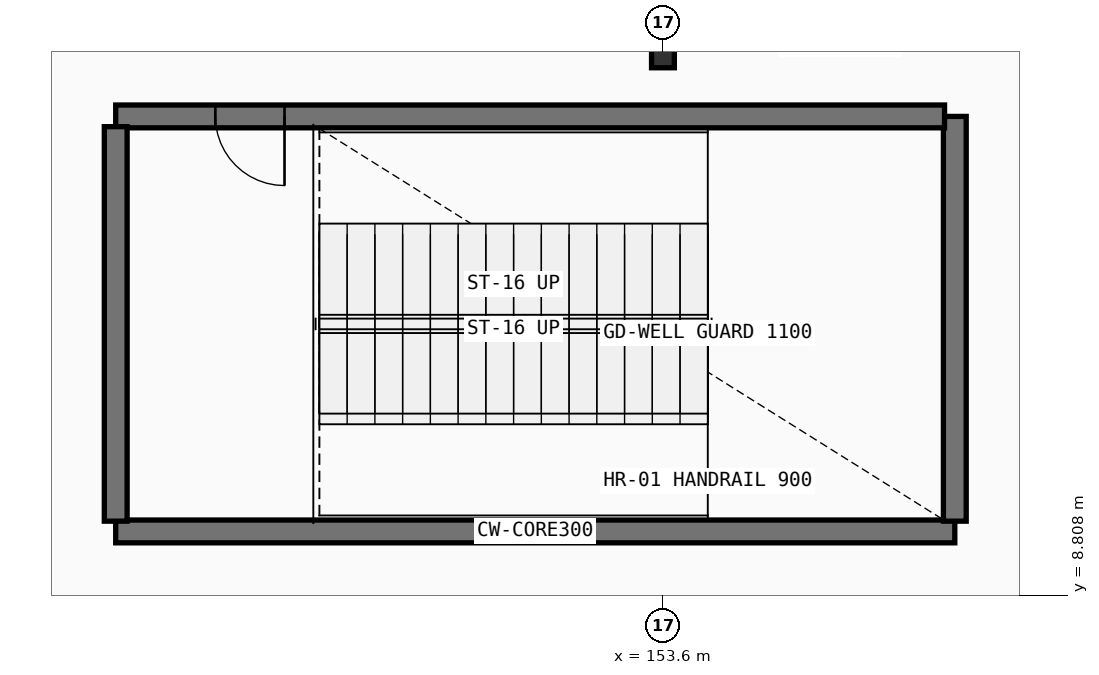
"""IFC4 building model, lengths in metres.
Left out: names, types, materials, properties, quantities, classifications, styles, units other than length and angle.
Written with IfcOpenShell. Run it as: python <this file> out.ifc"""

import sys

from ifc_helpers import new_model, si_unit, direction, frame, frame_2d, origin, origin_2d, place, context, subcontext, project, spatial, rectangle, i_section, extrude, element, fill, save


model = new_model("IFC4")
c1 = context("Model", 3, precision=1e-05, world=origin(), true_north=direction((0.0, 1.0)))
c2 = subcontext(c1, "Body", "Model", "MODEL_VIEW")
j1 = project(units=[si_unit("LENGTHUNIT", "METRE"), si_unit("PLANEANGLEUNIT", "RADIAN")], contexts=[c1])
p1 = place(None, origin())
s1 = spatial("IfcSite", under=j1, at=p1, CompositionType="ELEMENT")
p2 = place(p1, origin())
s2 = spatial("IfcBuilding", under=s1, at=p2, CompositionType="ELEMENT")
p3 = place(p2, frame((0.0, 0.0, 6.0)))
s3 = spatial("IfcBuildingStorey", under=s2, at=p3, CompositionType="ELEMENT", Elevation=6.0)
p4 = place(p3, frame((153.6, 16.0, 0.0), z_axis=(0.0, 0.0, 1.0), x_axis=(1.0, 0.0, 0.0)))
e1 = element("IfcColumn", 1, at=p4, inside=s3, PredefinedType="COLUMN", context=c2, shape_type="SweptSolid", body=[
    extrude(i_section(OverallWidth=0.3, OverallDepth=0.5, WebThickness=0.014, FlangeThickness=0.028, FilletRadius=0.027, at=origin_2d()), origin(), (0.0, 0.0, 1.0), 5.4),
])
p5 = place(p3, frame((146.4, 9.65, 0.0), z_axis=(0.0, 0.0, 1.0), x_axis=(1.0, 0.0, 0.0)))
e2 = element("IfcWall", 2, at=p5, inside=s3, PredefinedType="SHEAR", context=c2, shape_type="SweptSolid", body=[
    extrude(rectangle(XDim=11.04, YDim=0.3, at=frame_2d((5.52, 0.0))), origin(), (0.0, 0.0, 1.0), 5.17),
])
p6 = place(p3, frame((157.44, 9.785, 0.0), z_axis=(0.0, 0.0, 1.0), x_axis=(0.0, 1.0, 0.0)))
e3 = element("IfcWall", 3, at=p6, inside=s3, PredefinedType="SHEAR", context=c2, shape_type="SweptSolid", body=[
    extrude(rectangle(XDim=5.325, YDim=0.3, at=frame_2d((2.663, 0.0))), origin(), (0.0, 0.0, 1.0), 5.17),
])
p7 = place(p3, frame((157.305, 15.11, 0.0), z_axis=(0.0, 0.0, 1.0), x_axis=(-1.0, 0.0, 0.0)))
e4 = element("IfcWall", 4, at=p7, inside=s3, PredefinedType="SHEAR", context=c2, shape_type="SweptSolid", body=[
    extrude(rectangle(XDim=10.905, YDim=0.3, at=frame_2d((5.453, 0.0))), origin(), (0.0, 0.0, 1.0), 5.17),
])
p8 = place(p7, frame((8.684, 0.0, 0.0)))
e5 = element("IfcOpeningElement", 5, at=p8, cuts=e4, PredefinedType="OPENING", context=c2, shape_type="SweptSolid", body=[
    extrude(rectangle(XDim=0.91, YDim=2.08, at=frame_2d((0.455, 1.04))), frame((0.0, 0.16, 0.0), z_axis=(0.0, -1.0, 0.0), x_axis=(1.0, 0.0, 0.0)), (0.0, 0.0, 1.0), 0.32),
])
p9 = place(p3, frame((146.4, 14.975, 0.0), z_axis=(0.0, 0.0, 1.0), x_axis=(0.0, -1.0, 0.0)))
e6 = element("IfcWall", 6, at=p9, inside=s3, PredefinedType="SHEAR", context=c2, shape_type="SweptSolid", body=[
    extrude(rectangle(XDim=5.19, YDim=0.3, at=frame_2d((2.595, 0.0))), origin(), (0.0, 0.0, 1.0), 5.17),
])
p10 = place(p8, origin())
e7 = element("IfcDoor", 7, at=p10, inside=s3, OperationType="SINGLE_SWING_RIGHT", PredefinedType="DOOR", context=c2, shape_type="SweptSolid", body=[
    extrude(rectangle(XDim=0.91, YDim=2.08, at=frame_2d((0.455, 1.04))), frame((0.0, 0.025, 0.0), z_axis=(0.0, -1.0, 0.0), x_axis=(1.0, 0.0, 0.0)), (0.0, 0.0, 1.0), 0.05),
])
fill(e5, e7)
save(model, sys.argv[1])
